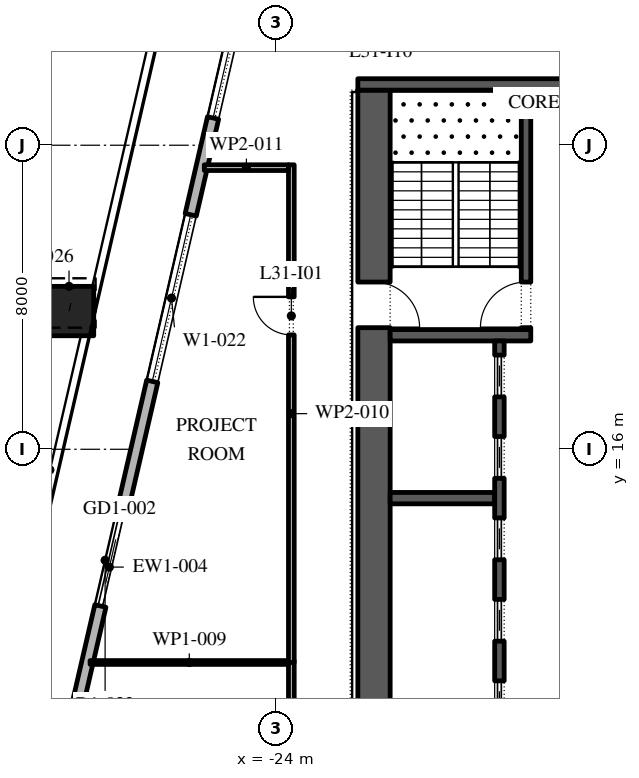
"""IFC4 building model, lengths in metres.
Left out: names, types, materials, properties, quantities, classifications, styles, units other than length and angle.
Written with IfcOpenShell. Run it as: python <this file> out.ifc"""

import sys

from ifc_helpers import new_model, si_unit, direction, frame, frame_2d, origin, origin_2d, place, context, subcontext, project, spatial, rectangle, extrude, element, fill, save


model = new_model("IFC4")
c1 = context("Model", 3, precision=1e-05, world=origin(), true_north=direction((0.0, 1.0)))
c2 = subcontext(c1, "Body", "Model", "MODEL_VIEW")
j1 = project(units=[si_unit("LENGTHUNIT", "METRE"), si_unit("PLANEANGLEUNIT", "RADIAN")], contexts=[c1])
p1 = place(None, origin())
s1 = spatial("IfcSite", under=j1, at=p1, CompositionType="ELEMENT")
p2 = place(p1, origin())
s2 = spatial("IfcBuilding", under=s1, at=p2, CompositionType="ELEMENT")
p3 = place(p2, frame((0.0, 0.0, 143.4)))
s3 = spatial("IfcBuildingStorey", under=s2, at=p3, CompositionType="ELEMENT", Elevation=143.4)
p4 = place(p3, frame((-29.45, 19.637, 0.0), z_axis=(0.011667590749, 0.050559559912, 0.998652891764), x_axis=(-0.974391195695, 0.224859506699, 0.0)))
e1 = element("IfcColumn", 1, at=p4, inside=s3, PredefinedType="COLUMN", context=c2, shape_type="SweptSolid", body=[
    extrude(rectangle(XDim=1.3, YDim=1.3, at=origin_2d()), origin(), (0.0, 0.0, 1.0), 4.206),
])
p5 = place(p3, frame((-22.82, 37.016, 0.0), z_axis=(0.0, 0.0, 1.0), x_axis=(-0.224953880882, -0.974369412223, 0.0)))
e2 = element("IfcWall", 2, at=p5, inside=s3, PredefinedType="STANDARD", context=c2, shape_type="SweptSolid", body=[
    extrude(rectangle(XDim=49.5, YDim=0.3, at=frame_2d((24.75, 0.0))), origin(), (0.0, 0.0, 1.0), 4.0),
])
p6 = place(p5, frame((1.157, 0.0, 0.45)))
e3 = element("IfcOpeningElement", 3, at=p6, cuts=e2, PredefinedType="OPENING", context=c2, shape_type="SweptSolid", body=[
    extrude(rectangle(XDim=4.5, YDim=3.05, at=frame_2d((2.25, 1.525))), frame((0.0, 0.16, 0.0), z_axis=(0.0, -1.0, 0.0), x_axis=(1.0, 0.0, 0.0)), (0.0, 0.0, 1.0), 0.32),
])
p7 = place(p5, frame((8.121, 0.0, 0.45)))
e4 = element("IfcOpeningElement", 4, at=p7, cuts=e2, PredefinedType="OPENING", context=c2, shape_type="SweptSolid", body=[
    extrude(rectangle(XDim=4.5, YDim=3.05, at=frame_2d((2.25, 1.525))), frame((0.0, 0.16, 0.0), z_axis=(0.0, -1.0, 0.0), x_axis=(1.0, 0.0, 0.0)), (0.0, 0.0, 1.0), 0.32),
])
p8 = place(p5, frame((15.236, 0.0, 0.45)))
e5 = element("IfcOpeningElement", 5, at=p8, cuts=e2, PredefinedType="OPENING", context=c2, shape_type="SweptSolid", body=[
    extrude(rectangle(XDim=4.5, YDim=3.05, at=frame_2d((2.25, 1.525))), frame((0.0, 0.16, 0.0), z_axis=(0.0, -1.0, 0.0), x_axis=(1.0, 0.0, 0.0)), (0.0, 0.0, 1.0), 0.32),
])
p9 = place(p5, frame((23.4, 0.0, 0.0)))
e6 = element("IfcOpeningElement", 6, at=p9, cuts=e2, PredefinedType="OPENING", context=c2, shape_type="SweptSolid", body=[
    extrude(rectangle(XDim=2.4, YDim=3.5, at=frame_2d((1.2, 1.75))), frame((0.0, 0.16, 0.0), z_axis=(0.0, -1.0, 0.0), x_axis=(1.0, 0.0, 0.0)), (0.0, 0.0, 1.0), 0.32),
])
p10 = place(p5, frame((29.464, 0.0, 0.45)))
e7 = element("IfcOpeningElement", 7, at=p10, cuts=e2, PredefinedType="OPENING", context=c2, shape_type="SweptSolid", body=[
    extrude(rectangle(XDim=4.5, YDim=2.875, at=frame_2d((2.25, 1.438))), frame((0.0, 0.16, 0.0), z_axis=(0.0, -1.0, 0.0), x_axis=(1.0, 0.0, 0.0)), (0.0, 0.0, 1.0), 0.32),
])
p11 = place(p5, frame((36.579, 0.0, 0.45)))
e8 = element("IfcOpeningElement", 8, at=p11, cuts=e2, PredefinedType="OPENING", context=c2, shape_type="SweptSolid", body=[
    extrude(rectangle(XDim=4.5, YDim=2.675, at=frame_2d((2.25, 1.337))), frame((0.0, 0.16, 0.0), z_axis=(0.0, -1.0, 0.0), x_axis=(1.0, 0.0, 0.0)), (0.0, 0.0, 1.0), 0.32),
])
p12 = place(p5, frame((43.693, 0.0, 0.45)))
e9 = element("IfcOpeningElement", 9, at=p12, cuts=e2, PredefinedType="OPENING", context=c2, shape_type="SweptSolid", body=[
    extrude(rectangle(XDim=4.5, YDim=3.05, at=frame_2d((2.25, 1.525))), frame((0.0, 0.16, 0.0), z_axis=(0.0, -1.0, 0.0), x_axis=(1.0, 0.0, 0.0)), (0.0, 0.0, 1.0), 0.32),
])
p13 = place(p3, frame((-21.425, -2.45, 0.0), z_axis=(0.0, 0.0, 1.0), x_axis=(0.0, 1.0, 0.0)))
e10 = element("IfcWall", 10, at=p13, inside=s3, PredefinedType="SHEAR", context=c2, shape_type="SweptSolid", body=[
    extrude(rectangle(XDim=27.9, YDim=0.85, at=frame_2d((13.95, 0.0))), origin(), (0.0, 0.0, 1.0), 4.0),
])
p14 = place(p13, frame((5.05, 0.0, 0.0)))
e11 = element("IfcOpeningElement", 11, at=p14, cuts=e10, PredefinedType="OPENING", context=c2, shape_type="SweptSolid", body=[
    extrude(rectangle(XDim=1.2, YDim=2.1, at=frame_2d((0.6, 1.05))), frame((0.0, 0.435, 0.0), z_axis=(0.0, -1.0, 0.0), x_axis=(1.0, 0.0, 0.0)), (0.0, 0.0, 1.0), 0.87),
])
p15 = place(p13, frame((21.65, 0.0, 0.0)))
e12 = element("IfcOpeningElement", 12, at=p15, cuts=e10, PredefinedType="OPENING", context=c2, shape_type="SweptSolid", body=[
    extrude(rectangle(XDim=1.2, YDim=2.1, at=frame_2d((0.6, 1.05))), frame((0.0, 0.435, 0.0), z_axis=(0.0, -1.0, 0.0), x_axis=(1.0, 0.0, 0.0)), (0.0, 0.0, 1.0), 0.87),
])
p16 = place(p3, frame((-21.85, 25.6, 0.0), z_axis=(0.0, 0.0, 1.0), x_axis=(1.0, 0.0, 0.0)))
e13 = element("IfcWall", 13, at=p16, inside=s3, PredefinedType="SHEAR", context=c2, shape_type="SweptSolid", body=[
    extrude(rectangle(XDim=11.7, YDim=0.3, at=frame_2d((5.85, 0.0))), origin(), (0.0, 0.0, 1.0), 4.0),
])
p17 = place(p3, frame((-21.0, 19.0, 0.0), z_axis=(0.0, 0.0, 1.0), x_axis=(1.0, 0.0, 0.0)))
e14 = element("IfcWall", 14, at=p17, inside=s3, PredefinedType="SHEAR", context=c2, shape_type="SweptSolid", body=[
    extrude(rectangle(XDim=3.7, YDim=0.3, at=frame_2d((1.85, 0.0))), origin(), (0.0, 0.0, 1.0), 4.0),
])
p18 = place(p3, frame((-17.425, 19.15, 0.0), z_axis=(0.0, 0.0, 1.0), x_axis=(0.0, 1.0, 0.0)))
e15 = element("IfcWall", 15, at=p18, inside=s3, PredefinedType="SHEAR", context=c2, shape_type="SweptSolid", body=[
    extrude(rectangle(XDim=6.3, YDim=0.25, at=frame_2d((3.15, 0.0))), origin(), (0.0, 0.0, 1.0), 4.0),
])
p19 = place(p18, frame((0.05, 0.0, 0.0)))
e16 = element("IfcOpeningElement", 16, at=p19, cuts=e15, PredefinedType="OPENING", context=c2, shape_type="SweptSolid", body=[
    extrude(rectangle(XDim=1.2, YDim=2.1, at=frame_2d((0.6, 1.05))), frame((0.0, 0.135, 0.0), z_axis=(0.0, -1.0, 0.0), x_axis=(1.0, 0.0, 0.0)), (0.0, 0.0, 1.0), 0.27),
])
p20 = place(p3, frame((-21.0, 14.714, 0.0), z_axis=(0.0, 0.0, 1.0), x_axis=(1.0, 0.0, 0.0)))
e17 = element("IfcWall", 17, at=p20, inside=s3, PredefinedType="SHEAR", context=c2, shape_type="SweptSolid", body=[
    extrude(rectangle(XDim=2.75, YDim=0.3, at=frame_2d((1.375, 0.0))), origin(), (0.0, 0.0, 1.0), 4.0),
])
p21 = place(p3, frame((-18.125, 4.15, 0.0), z_axis=(0.0, 0.0, 1.0), x_axis=(0.0, 1.0, 0.0)))
e18 = element("IfcWall", 18, at=p21, inside=s3, PredefinedType="SHEAR", context=c2, shape_type="SweptSolid", body=[
    extrude(rectangle(XDim=14.7, YDim=0.25, at=frame_2d((7.35, 0.0))), origin(), (0.0, 0.0, 1.0), 4.0),
])
p22 = place(p21, frame((0.371, 0.0, 0.0)))
e19 = element("IfcOpeningElement", 19, at=p22, cuts=e18, PredefinedType="OPENING", context=c2, shape_type="SweptSolid", body=[
    extrude(rectangle(XDim=1.1, YDim=2.1, at=frame_2d((0.55, 1.05))), frame((0.0, 0.135, 0.0), z_axis=(0.0, -1.0, 0.0), x_axis=(1.0, 0.0, 0.0)), (0.0, 0.0, 1.0), 0.27),
])
p23 = place(p21, frame((2.514, 0.0, 0.0)))
e20 = element("IfcOpeningElement", 20, at=p23, cuts=e18, PredefinedType="OPENING", context=c2, shape_type="SweptSolid", body=[
    extrude(rectangle(XDim=1.1, YDim=2.1, at=frame_2d((0.55, 1.05))), frame((0.0, 0.135, 0.0), z_axis=(0.0, -1.0, 0.0), x_axis=(1.0, 0.0, 0.0)), (0.0, 0.0, 1.0), 0.27),
])
p24 = place(p21, frame((4.657, 0.0, 0.0)))
e21 = element("IfcOpeningElement", 21, at=p24, cuts=e18, PredefinedType="OPENING", context=c2, shape_type="SweptSolid", body=[
    extrude(rectangle(XDim=1.1, YDim=2.1, at=frame_2d((0.55, 1.05))), frame((0.0, 0.135, 0.0), z_axis=(0.0, -1.0, 0.0), x_axis=(1.0, 0.0, 0.0)), (0.0, 0.0, 1.0), 0.27),
])
p25 = place(p21, frame((6.8, 0.0, 0.0)))
e22 = element("IfcOpeningElement", 22, at=p25, cuts=e18, PredefinedType="OPENING", context=c2, shape_type="SweptSolid", body=[
    extrude(rectangle(XDim=1.1, YDim=2.1, at=frame_2d((0.55, 1.05))), frame((0.0, 0.135, 0.0), z_axis=(0.0, -1.0, 0.0), x_axis=(1.0, 0.0, 0.0)), (0.0, 0.0, 1.0), 0.27),
])
p26 = place(p21, frame((8.943, 0.0, 0.0)))
e23 = element("IfcOpeningElement", 23, at=p26, cuts=e18, PredefinedType="OPENING", context=c2, shape_type="SweptSolid", body=[
    extrude(rectangle(XDim=1.1, YDim=2.1, at=frame_2d((0.55, 1.05))), frame((0.0, 0.135, 0.0), z_axis=(0.0, -1.0, 0.0), x_axis=(1.0, 0.0, 0.0)), (0.0, 0.0, 1.0), 0.27),
])
p27 = place(p21, frame((11.086, 0.0, 0.0)))
e24 = element("IfcOpeningElement", 24, at=p27, cuts=e18, PredefinedType="OPENING", context=c2, shape_type="SweptSolid", body=[
    extrude(rectangle(XDim=1.1, YDim=2.1, at=frame_2d((0.55, 1.05))), frame((0.0, 0.135, 0.0), z_axis=(0.0, -1.0, 0.0), x_axis=(1.0, 0.0, 0.0)), (0.0, 0.0, 1.0), 0.27),
])
p28 = place(p21, frame((13.229, 0.0, 0.0)))
e25 = element("IfcOpeningElement", 25, at=p28, cuts=e18, PredefinedType="OPENING", context=c2, shape_type="SweptSolid", body=[
    extrude(rectangle(XDim=1.1, YDim=2.1, at=frame_2d((0.55, 1.05))), frame((0.0, 0.135, 0.0), z_axis=(0.0, -1.0, 0.0), x_axis=(1.0, 0.0, 0.0)), (0.0, 0.0, 1.0), 0.27),
])
p29 = place(p3, frame((-23.6, -4.245, 0.0), z_axis=(0.0, 0.0, 1.0), x_axis=(0.0, 1.0, 0.0)))
e26 = element("IfcWall", 26, at=p29, inside=s3, PredefinedType="PARTITIONING", context=c2, shape_type="SweptSolid", body=[
    extrude(rectangle(XDim=14.685, YDim=0.15, at=frame_2d((7.343, 0.0))), origin(), (0.0, 0.0, 1.0), 4.0),
])
p30 = place(p29, frame((3.735, 0.0, 0.0)))
e27 = element("IfcOpeningElement", 27, at=p30, cuts=e26, PredefinedType="OPENING", context=c2, shape_type="SweptSolid", body=[
    extrude(rectangle(XDim=1.0, YDim=2.1, at=frame_2d((0.5, 1.05))), frame((0.0, 0.085, 0.0), z_axis=(0.0, -1.0, 0.0), x_axis=(1.0, 0.0, 0.0)), (0.0, 0.0, 1.0), 0.17),
])
p31 = place(p3, frame((-23.675, 10.39, 0.0), z_axis=(0.0, 0.0, 1.0), x_axis=(-1.0, 0.0, 0.0)))
e28 = element("IfcWall", 28, at=p31, inside=s3, PredefinedType="PARTITIONING", context=c2, shape_type="SweptSolid", body=[
    extrude(rectangle(XDim=5.221, YDim=0.1, at=frame_2d((2.61, 0.0))), origin(), (0.0, 0.0, 1.0), 4.0),
])
p32 = place(p3, frame((-23.6, 10.39, 0.0), z_axis=(0.0, 0.0, 1.0), x_axis=(0.0, 1.0, 0.0)))
e29 = element("IfcWall", 29, at=p32, inside=s3, PredefinedType="PARTITIONING", context=c2, shape_type="SweptSolid", body=[
    extrude(rectangle(XDim=13.095, YDim=0.15, at=frame_2d((6.548, 0.0))), origin(), (0.0, 0.0, 1.0), 4.0),
])
p33 = place(p32, frame((8.62, 0.0, 0.0)))
e30 = element("IfcOpeningElement", 30, at=p33, cuts=e29, PredefinedType="OPENING", context=c2, shape_type="SweptSolid", body=[
    extrude(rectangle(XDim=1.0, YDim=2.1, at=frame_2d((0.5, 1.05))), frame((0.0, 0.085, 0.0), z_axis=(0.0, -1.0, 0.0), x_axis=(1.0, 0.0, 0.0)), (0.0, 0.0, 1.0), 0.17),
])
p34 = place(p3, frame((-23.675, 23.41, 0.0), z_axis=(0.0, 0.0, 1.0), x_axis=(-1.0, 0.0, 0.0)))
e31 = element("IfcWall", 31, at=p34, inside=s3, PredefinedType="PARTITIONING", context=c2, shape_type="SweptSolid", body=[
    extrude(rectangle(XDim=2.215, YDim=0.15, at=frame_2d((1.107, 0.0))), origin(), (0.0, 0.0, 1.0), 4.0),
])
p35 = place(p7, origin())
e32 = element("IfcWindow", 32, at=p35, inside=s3, PartitioningType="DOUBLE_PANEL_VERTICAL", PredefinedType="WINDOW", context=c2, shape_type="SweptSolid", body=[
    extrude(rectangle(XDim=4.5, YDim=3.05, at=frame_2d((2.25, 1.525))), frame((0.0, 0.03, 0.0), z_axis=(0.0, -1.0, 0.0), x_axis=(1.0, 0.0, 0.0)), (0.0, 0.0, 1.0), 0.06),
])
fill(e4, e32)
p36 = place(p8, origin())
e33 = element("IfcWindow", 33, at=p36, inside=s3, PartitioningType="DOUBLE_PANEL_VERTICAL", PredefinedType="WINDOW", context=c2, shape_type="SweptSolid", body=[
    extrude(rectangle(XDim=4.5, YDim=3.05, at=frame_2d((2.25, 1.525))), frame((0.0, 0.03, 0.0), z_axis=(0.0, -1.0, 0.0), x_axis=(1.0, 0.0, 0.0)), (0.0, 0.0, 1.0), 0.06),
])
fill(e5, e33)
p37 = place(p9, origin())
e34 = element("IfcDoor", 34, at=p37, inside=s3, OperationType="DOUBLE_DOOR_SLIDING", PredefinedType="DOOR", context=c2, shape_type="SweptSolid", body=[
    extrude(rectangle(XDim=2.4, YDim=3.5, at=frame_2d((1.2, 1.75))), frame((0.0, 0.025, 0.0), z_axis=(0.0, -1.0, 0.0), x_axis=(1.0, 0.0, 0.0)), (0.0, 0.0, 1.0), 0.05),
])
fill(e6, e34)
p38 = place(p24, origin())
e35 = element("IfcDoor", 35, at=p38, inside=s3, OperationType="SLIDING_TO_LEFT", PredefinedType="DOOR", context=c2, shape_type="SweptSolid", body=[
    extrude(rectangle(XDim=1.1, YDim=2.1, at=frame_2d((0.55, 1.05))), frame((0.0, 0.025, 0.0), z_axis=(0.0, -1.0, 0.0), x_axis=(1.0, 0.0, 0.0)), (0.0, 0.0, 1.0), 0.05),
])
fill(e21, e35)
p39 = place(p25, origin())
e36 = element("IfcDoor", 36, at=p39, inside=s3, OperationType="SLIDING_TO_LEFT", PredefinedType="DOOR", context=c2, shape_type="SweptSolid", body=[
    extrude(rectangle(XDim=1.1, YDim=2.1, at=frame_2d((0.55, 1.05))), frame((0.0, 0.025, 0.0), z_axis=(0.0, -1.0, 0.0), x_axis=(1.0, 0.0, 0.0)), (0.0, 0.0, 1.0), 0.05),
])
fill(e22, e36)
p40 = place(p26, origin())
e37 = element("IfcDoor", 37, at=p40, inside=s3, OperationType="SLIDING_TO_LEFT", PredefinedType="DOOR", context=c2, shape_type="SweptSolid", body=[
    extrude(rectangle(XDim=1.1, YDim=2.1, at=frame_2d((0.55, 1.05))), frame((0.0, 0.025, 0.0), z_axis=(0.0, -1.0, 0.0), x_axis=(1.0, 0.0, 0.0)), (0.0, 0.0, 1.0), 0.05),
])
fill(e23, e37)
p41 = place(p27, origin())
e38 = element("IfcDoor", 38, at=p41, inside=s3, OperationType="SLIDING_TO_LEFT", PredefinedType="DOOR", context=c2, shape_type="SweptSolid", body=[
    extrude(rectangle(XDim=1.1, YDim=2.1, at=frame_2d((0.55, 1.05))), frame((0.0, 0.025, 0.0), z_axis=(0.0, -1.0, 0.0), x_axis=(1.0, 0.0, 0.0)), (0.0, 0.0, 1.0), 0.05),
])
fill(e24, e38)
p42 = place(p28, origin())
e39 = element("IfcDoor", 39, at=p42, inside=s3, OperationType="SLIDING_TO_LEFT", PredefinedType="DOOR", context=c2, shape_type="SweptSolid", body=[
    extrude(rectangle(XDim=1.1, YDim=2.1, at=frame_2d((0.55, 1.05))), frame((0.0, 0.025, 0.0), z_axis=(0.0, -1.0, 0.0), x_axis=(1.0, 0.0, 0.0)), (0.0, 0.0, 1.0), 0.05),
])
fill(e25, e39)
p43 = place(p19, origin())
e40 = element("IfcDoor", 40, at=p43, inside=s3, OperationType="SINGLE_SWING_RIGHT", PredefinedType="DOOR", context=c2, shape_type="SweptSolid", body=[
    extrude(rectangle(XDim=1.2, YDim=2.1, at=frame_2d((0.6, 1.05))), frame((0.0, 0.025, 0.0), z_axis=(0.0, -1.0, 0.0), x_axis=(1.0, 0.0, 0.0)), (0.0, 0.0, 1.0), 0.05),
])
fill(e16, e40)
p44 = place(p15, frame((1.2, 0.0, 0.0), z_axis=(0.0, 0.0, 1.0), x_axis=(-1.0, 0.0, 0.0)))
e41 = element("IfcDoor", 41, at=p44, inside=s3, OperationType="SINGLE_SWING_LEFT", PredefinedType="DOOR", context=c2, shape_type="SweptSolid", body=[
    extrude(rectangle(XDim=1.2, YDim=2.1, at=frame_2d((0.6, 1.05))), frame((0.0, 0.025, 0.0), z_axis=(0.0, -1.0, 0.0), x_axis=(1.0, 0.0, 0.0)), (0.0, 0.0, 1.0), 0.05),
])
fill(e12, e41)
p45 = place(p33, origin())
e42 = element("IfcDoor", 42, at=p45, inside=s3, OperationType="SINGLE_SWING_LEFT", PredefinedType="DOOR", context=c2, shape_type="SweptSolid", body=[
    extrude(rectangle(XDim=1.0, YDim=2.1, at=frame_2d((0.5, 1.05))), frame((0.0, 0.025, 0.0), z_axis=(0.0, -1.0, 0.0), x_axis=(1.0, 0.0, 0.0)), (0.0, 0.0, 1.0), 0.05),
])
fill(e30, e42)
save(model, sys.argv[1])
